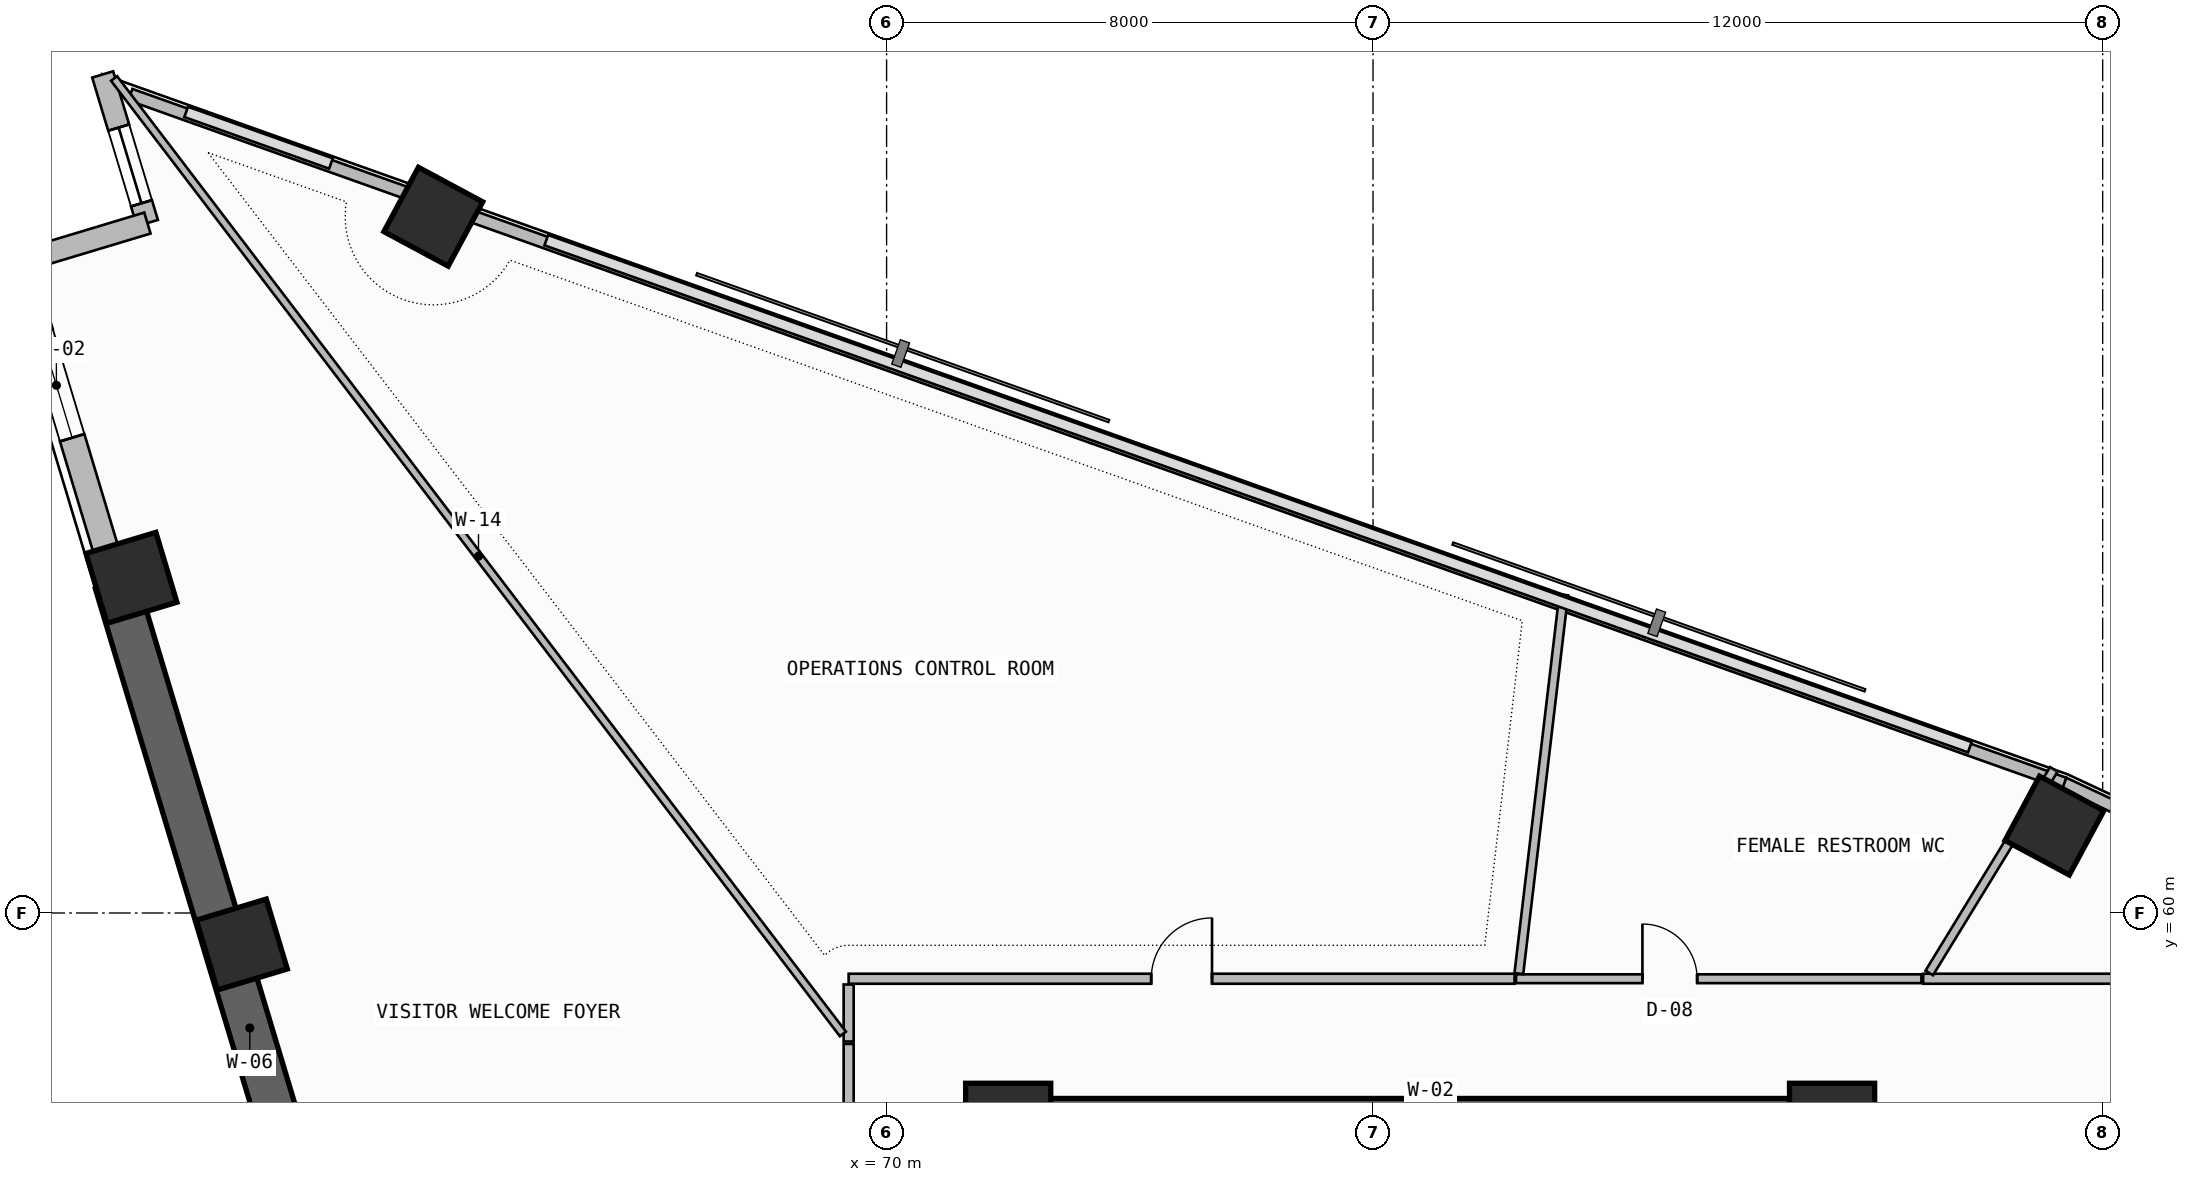
"""IFC4 building model, lengths in metres.
Left out: names, types, materials, properties, quantities, classifications, styles, units other than length and angle.
Written with IfcOpenShell. Run it as: python <this file> out.ifc"""

import sys

from ifc_helpers import new_model, si_unit, direction, frame, frame_2d, origin, origin_2d, place, context, subcontext, project, spatial, rectangle, extrude, element, fill, save


model = new_model("IFC4")
c1 = context("Model", 3, precision=1e-05, world=origin(), true_north=direction((0.0, 1.0)))
c2 = subcontext(c1, "Body", "Model", "MODEL_VIEW")
j1 = project(units=[si_unit("LENGTHUNIT", "METRE"), si_unit("PLANEANGLEUNIT", "RADIAN")], contexts=[c1])
p1 = place(None, origin())
s1 = spatial("IfcSite", under=j1, at=p1, CompositionType="ELEMENT")
p2 = place(p1, origin())
s2 = spatial("IfcBuilding", under=s1, at=p2, CompositionType="ELEMENT")
p3 = place(p2, frame((0.0, 0.0, 150.3)))
s3 = spatial("IfcBuildingStorey", under=s2, at=p3, CompositionType="ELEMENT", Elevation=150.3)
p4 = place(p3, frame((72.0, 56.5, -0.26), z_axis=(0.0, 0.0, 1.0), x_axis=(1.0, 0.0, 0.0)))
e1 = element("IfcWall", 1, at=p4, inside=s3, PredefinedType="SHEAR", context=c2, shape_type="SweptSolid", body=[
    extrude(rectangle(XDim=13.9, YDim=0.9, at=frame_2d((6.95, 0.0))), origin(), (0.0, 0.0, 1.0), 3.6),
])
for number, where, z_axis, x_axis in (
    (2, (72.0, 56.5, 0.0), (0.0, 0.0, 1.0), (1.0, 0.0, 0.0)),
    (3, (85.55, 56.5, 0.0), (0.0, 0.0, 1.0), (1.0, 0.0, 0.0)),
):
    element("IfcColumn", number, at=place(p3, frame(where, z_axis=z_axis, x_axis=x_axis)), inside=s3, PredefinedType="COLUMN", context=c2, shape_type="SweptSolid", body=[
        extrude(rectangle(XDim=1.4, YDim=1.4, at=origin_2d()), origin(), (0.0, 0.0, 1.0), 3.6),
    ])
for number, where, z_axis, x_axis in (
    (4, (89.207, 61.438, 0.0), (0.0, 0.0, 1.0), (0.473, 0.881, 0.0)),
    (5, (62.545, 71.45, 0.0), (0.0, 0.0, 1.0), (0.473, 0.881, 0.0)),
    (6, (57.581, 65.512, 0.0), (0.0, 0.0, 1.0), (-0.288, 0.958, 0.0)),
    (7, (59.396, 59.481, 0.0), (0.0, 0.0, 1.0), (-0.288, 0.958, 0.0)),
):
    element("IfcColumn", number, at=place(p3, frame(where, z_axis=z_axis, x_axis=x_axis)), inside=s3, PredefinedType="COLUMN", context=c2, shape_type="SweptSolid", body=[
        extrude(rectangle(XDim=1.2, YDim=1.2, at=origin_2d()), origin(), (0.0, 0.0, 1.0), 3.6),
    ])
p5 = place(p3, frame((55.734, 70.711, 0.0), z_axis=(0.0, 0.0, 1.0), x_axis=(0.288221590884, -0.957563739157, 0.0)))
e8 = element("IfcWall", 8, at=p5, inside=s3, PredefinedType="SOLIDWALL", context=c2, shape_type="SweptSolid", body=[
    extrude(rectangle(XDim=5.511, YDim=0.42, at=frame_2d((2.755, 0.0))), origin(), (0.0, 0.0, 1.0), 2.725),
])
p6 = place(p5, frame((1.223, 0.0, 1.2)))
e9 = element("IfcOpeningElement", 9, at=p6, cuts=e8, PredefinedType="OPENING", context=c2, shape_type="SweptSolid", body=[
    extrude(rectangle(XDim=1.8, YDim=0.9, at=frame_2d((0.9, 0.45))), frame((0.0, 0.22, 0.0), z_axis=(0.0, -1.0, 0.0), x_axis=(1.0, 0.0, 0.0)), (0.0, 0.0, 1.0), 0.44),
])
p7 = place(p3, frame((57.323, 65.434, -0.26), z_axis=(0.0, 0.0, 1.0), x_axis=(0.288188159352, -0.957573801234, 0.0)))
e10 = element("IfcWall", 10, at=p7, inside=s3, PredefinedType="SHEAR", context=c2, shape_type="SweptSolid", body=[
    extrude(rectangle(XDim=20.469, YDim=0.7, at=frame_2d((10.234, 0.0))), origin(), (0.0, 0.0, 1.0), 3.6),
])
p8 = place(p7, frame((15.3, 0.0, 1.2)))
e11 = element("IfcOpeningElement", 11, at=p8, cuts=e10, PredefinedType="OPENING", context=c2, shape_type="SweptSolid", body=[
    extrude(rectangle(XDim=1.8, YDim=0.9, at=frame_2d((0.9, 0.45))), frame((0.0, 0.36, 0.0), z_axis=(0.0, -1.0, 0.0), x_axis=(1.0, 0.0, 0.0)), (0.0, 0.0, 1.0), 0.72),
])
p9 = place(p3, frame((57.108, 73.79, 0.0), z_axis=(0.0, 0.0, 1.0), x_axis=(0.288198985694, -0.957570542908, 0.0)))
e12 = element("IfcWall", 12, at=p9, inside=s3, PredefinedType="SOLIDWALL", context=c2, shape_type="SweptSolid", body=[
    extrude(rectangle(XDim=2.552, YDim=0.36, at=frame_2d((1.276, 0.0))), origin(), (0.0, 0.0, 1.0), 3.34),
])
p10 = place(p9, frame((0.913, 0.0, 0.45)))
e13 = element("IfcOpeningElement", 13, at=p10, cuts=e12, PredefinedType="OPENING", context=c2, shape_type="SweptSolid", body=[
    extrude(rectangle(XDim=1.3, YDim=2.4, at=frame_2d((0.65, 1.2))), frame((0.0, 0.19, 0.0), z_axis=(0.0, -1.0, 0.0), x_axis=(1.0, 0.0, 0.0)), (0.0, 0.0, 1.0), 0.38),
])
p11 = place(p3, frame((57.843, 71.346, 0.0), z_axis=(0.0, 0.0, 1.0), x_axis=(-0.95757848653, -0.288172590882, 0.0)))
e14 = element("IfcWall", 14, at=p11, inside=s3, PredefinedType="SOLIDWALL", context=c2, shape_type="SweptSolid", body=[
    extrude(rectangle(XDim=2.553, YDim=0.36, at=frame_2d((1.276, 0.0))), origin(), (0.0, 0.0, 1.0), 3.34),
])
p12 = place(p3, frame((119.926, 47.843, 0.0), z_axis=(0.0, 0.0, 1.0), x_axis=(-0.905880730846, 0.423532881228, 0.0)))
e15 = element("IfcWall", 15, at=p12, inside=s3, PredefinedType="PARAPET", context=c2, shape_type="SweptSolid", body=[
    extrude(rectangle(XDim=33.748, YDim=0.2, at=frame_2d((16.874, 0.0))), origin(), (0.0, 0.0, 1.0), 1.15),
])
p13 = place(p3, frame((89.368, 62.13, 0.0), z_axis=(0.0, 0.0, 1.0), x_axis=(-0.942033439765, 0.335518998515, 0.0)))
e16 = element("IfcWall", 16, at=p13, inside=s3, PredefinedType="PARAPET", context=c2, shape_type="SweptSolid", body=[
    extrude(rectangle(XDim=27.969, YDim=0.2, at=frame_2d((13.985, 0.0))), origin(), (0.0, 0.0, 1.0), 1.15),
])
p14 = place(p3, frame((62.218, 71.801, 0.0), z_axis=(0.0, 0.0, 1.0), x_axis=(-0.942038862895, 0.335503771655, 0.0)))
e17 = element("IfcWall", 17, at=p14, inside=s3, PredefinedType="PARAPET", context=c2, shape_type="SweptSolid", body=[
    extrude(rectangle(XDim=4.942, YDim=0.2, at=frame_2d((2.471, 0.0))), origin(), (0.0, 0.0, 1.0), 1.15),
])
p15 = place(p3, frame((93.979, 58.919, 0.0), z_axis=(0.0, 0.0, 1.0), x_axis=(-1.0, 0.0, 0.0)))
e18 = element("IfcWall", 18, at=p15, inside=s3, PredefinedType="PARTITIONING", context=c2, shape_type="SweptSolid", body=[
    extrude(rectangle(XDim=6.932, YDim=0.165, at=frame_2d((3.466, 0.0))), origin(), (0.0, 0.0, 1.0), 2.725),
])
p16 = place(p3, frame((87.147, 59.013, 0.0), z_axis=(0.0, 0.0, 1.0), x_axis=(0.521958116248, 0.85297111609, 0.0)))
e19 = element("IfcWall", 19, at=p16, inside=s3, PredefinedType="PARTITIONING", context=c2, shape_type="SweptSolid", body=[
    extrude(rectangle(XDim=3.925, YDim=0.145, at=frame_2d((1.963, 0.0))), origin(), (0.0, 0.0, 1.0), 2.725),
])
p17 = place(p3, frame((87.019, 58.919, 0.0), z_axis=(0.0, 0.0, 1.0), x_axis=(-1.0, 0.0, 0.0)))
e20 = element("IfcWall", 20, at=p17, inside=s3, PredefinedType="PARTITIONING", context=c2, shape_type="SweptSolid", body=[
    extrude(rectangle(XDim=6.667, YDim=0.145, at=frame_2d((3.333, 0.0))), origin(), (0.0, 0.0, 1.0), 2.725),
])
p18 = place(p17, frame((3.689, 0.0, 0.0)))
e21 = element("IfcOpeningElement", 21, at=p18, cuts=e20, PredefinedType="OPENING", context=c2, shape_type="SweptSolid", body=[
    extrude(rectangle(XDim=0.9, YDim=2.1, at=frame_2d((0.45, 1.05))), frame((0.0, 0.083, 0.0), z_axis=(0.0, -1.0, 0.0), x_axis=(1.0, 0.0, 0.0)), (0.0, 0.0, 1.0), 0.165),
])
p19 = place(p3, frame((80.398, 59.003, 0.0), z_axis=(0.0, 0.0, 1.0), x_axis=(0.11770389137, 0.993048736949, 0.0)))
e22 = element("IfcWall", 22, at=p19, inside=s3, PredefinedType="PARTITIONING", context=c2, shape_type="SweptSolid", body=[
    extrude(rectangle(XDim=6.272, YDim=0.145, at=frame_2d((3.136, 0.0))), origin(), (0.0, 0.0, 1.0), 3.34),
])
p20 = place(p3, frame((80.328, 58.919, 0.0), z_axis=(0.0, 0.0, 1.0), x_axis=(-1.0, 0.0, 0.0)))
e23 = element("IfcWall", 23, at=p20, inside=s3, PredefinedType="PARTITIONING", context=c2, shape_type="SweptSolid", body=[
    extrude(rectangle(XDim=10.952, YDim=0.165, at=frame_2d((5.476, 0.0))), origin(), (0.0, 0.0, 1.0), 2.725),
])
p21 = place(p20, frame((4.976, 0.0, 0.0)))
e24 = element("IfcOpeningElement", 24, at=p21, cuts=e23, PredefinedType="OPENING", context=c2, shape_type="SweptSolid", body=[
    extrude(rectangle(XDim=1.0, YDim=2.2, at=frame_2d((0.5, 1.1))), frame((0.0, 0.093, 0.0), z_axis=(0.0, -1.0, 0.0), x_axis=(1.0, 0.0, 0.0)), (0.0, 0.0, 1.0), 0.185),
])
p22 = place(p3, frame((69.376, 58.824, 0.0), z_axis=(0.0, 0.0, 1.0), x_axis=(0.0, -1.0, 0.0)))
e25 = element("IfcWall", 25, at=p22, inside=s3, PredefinedType="PARTITIONING", context=c2, shape_type="SweptSolid", body=[
    extrude(rectangle(XDim=0.938, YDim=0.165, at=frame_2d((0.469, 0.0))), origin(), (0.0, 0.0, 1.0), 2.725),
])
p23 = place(p3, frame((69.282, 58.011, 0.0), z_axis=(0.0, 0.0, 1.0), x_axis=(-0.606526214548, 0.795063488702, 0.0)))
e26 = element("IfcWall", 26, at=p23, inside=s3, PredefinedType="PARTITIONING", context=c2, shape_type="SweptSolid", body=[
    extrude(rectangle(XDim=19.763, YDim=0.125, at=frame_2d((9.882, 0.0))), origin(), (0.0, 0.0, 1.0), 2.725),
])
p24 = place(p3, frame((69.376, 57.847, 0.0), z_axis=(0.0, 0.0, 1.0), x_axis=(0.0, -1.0, 0.0)))
e27 = element("IfcWall", 27, at=p24, inside=s3, PredefinedType="PARTITIONING", context=c2, shape_type="SweptSolid", body=[
    extrude(rectangle(XDim=7.361, YDim=0.165, at=frame_2d((3.681, 0.0))), origin(), (0.0, 0.0, 1.0), 2.725),
])
p25 = place(p24, frame((3.181, 0.0, 0.0)))
e28 = element("IfcOpeningElement", 28, at=p25, cuts=e27, PredefinedType="OPENING", context=c2, shape_type="SweptSolid", body=[
    extrude(rectangle(XDim=1.0, YDim=2.2, at=frame_2d((0.5, 1.1))), frame((0.0, 0.093, 0.0), z_axis=(0.0, -1.0, 0.0), x_axis=(1.0, 0.0, 0.0)), (0.0, 0.0, 1.0), 0.185),
])
p26 = place(p6, origin())
e29 = element("IfcWindow", 29, at=p26, inside=s3, PartitioningType="SINGLE_PANEL", PredefinedType="WINDOW", context=c2, shape_type="SweptSolid", body=[
    extrude(rectangle(XDim=1.8, YDim=0.9, at=frame_2d((0.9, 0.45))), frame((0.0, 0.03, 0.0), z_axis=(0.0, -1.0, 0.0), x_axis=(1.0, 0.0, 0.0)), (0.0, 0.0, 1.0), 0.06),
])
fill(e9, e29)
p27 = place(p10, origin())
e30 = element("IfcWindow", 30, at=p27, inside=s3, PartitioningType="SINGLE_PANEL", PredefinedType="WINDOW", context=c2, shape_type="SweptSolid", body=[
    extrude(rectangle(XDim=1.3, YDim=2.4, at=frame_2d((0.65, 1.2))), frame((0.0, 0.03, 0.0), z_axis=(0.0, -1.0, 0.0), x_axis=(1.0, 0.0, 0.0)), (0.0, 0.0, 1.0), 0.06),
])
fill(e13, e30)
p28 = place(p18, frame((0.9, 0.0, 0.0), z_axis=(0.0, 0.0, 1.0), x_axis=(-1.0, 0.0, 0.0)))
e31 = element("IfcDoor", 31, at=p28, inside=s3, OperationType="SINGLE_SWING_LEFT", PredefinedType="DOOR", context=c2, shape_type="SweptSolid", body=[
    extrude(rectangle(XDim=0.9, YDim=2.1, at=frame_2d((0.45, 1.05))), frame((0.0, 0.025, 0.0), z_axis=(0.0, -1.0, 0.0), x_axis=(1.0, 0.0, 0.0)), (0.0, 0.0, 1.0), 0.05),
])
fill(e21, e31)
p29 = place(p21, frame((1.0, 0.0, 0.0), z_axis=(0.0, 0.0, 1.0), x_axis=(-1.0, 0.0, 0.0)))
e32 = element("IfcDoor", 32, at=p29, inside=s3, OperationType="SINGLE_SWING_RIGHT", PredefinedType="DOOR", context=c2, shape_type="SweptSolid", body=[
    extrude(rectangle(XDim=1.0, YDim=2.2, at=frame_2d((0.5, 1.1))), frame((0.0, 0.025, 0.0), z_axis=(0.0, -1.0, 0.0), x_axis=(1.0, 0.0, 0.0)), (0.0, 0.0, 1.0), 0.05),
])
fill(e24, e32)
save(model, sys.argv[1])
